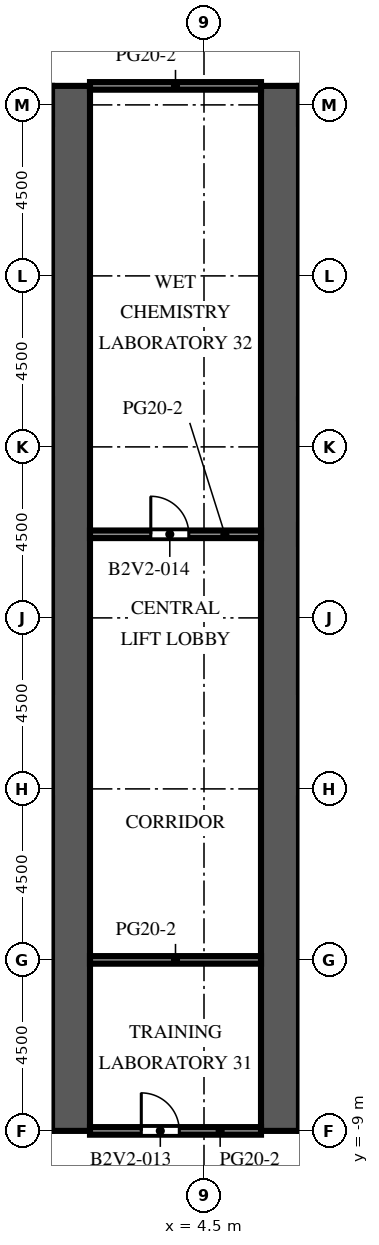
"""IFC4 building model, lengths in metres.
Left out: names, types, materials, properties, quantities, classifications, styles, units other than length and angle.
Written with IfcOpenShell. Run it as: python <this file> out.ifc"""

import sys

from ifc_helpers import new_model, si_unit, direction, frame, frame_2d, origin, place, context, subcontext, project, spatial, rectangle, extrude, element, fill, save


model = new_model("IFC4")
c1 = context("Model", 3, precision=1e-05, world=origin(), true_north=direction((0.0, 1.0)))
c2 = subcontext(c1, "Body", "Model", "MODEL_VIEW")
j1 = project(units=[si_unit("LENGTHUNIT", "METRE"), si_unit("PLANEANGLEUNIT", "RADIAN")], contexts=[c1])
p1 = place(None, origin())
s1 = spatial("IfcSite", under=j1, at=p1, CompositionType="ELEMENT")
p2 = place(p1, origin())
s2 = spatial("IfcBuilding", under=s1, at=p2, CompositionType="ELEMENT")
p3 = place(p2, frame((0.0, 0.0, 66.5)))
s3 = spatial("IfcBuildingStorey", under=s2, at=p3, CompositionType="ELEMENT", Elevation=66.5)
p4 = place(p3, frame((1.0, -9.0, 0.0), z_axis=(0.0, 0.0, 1.0), x_axis=(0.0, 1.0, 0.0)))
e1 = element("IfcWall", 1, at=p4, inside=s3, PredefinedType="SHEAR", context=c2, shape_type="SweptSolid", body=[
    extrude(rectangle(XDim=27.5, YDim=1.0, at=frame_2d((13.75, 0.0))), origin(), (0.0, 0.0, 1.0), 4.1),
])
p5 = place(p4, frame((12.55, 0.0, 0.0)))
e2 = element("IfcOpeningElement", 2, at=p5, cuts=e1, PredefinedType="OPENING", context=c2, shape_type="SweptSolid", body=[
    extrude(rectangle(XDim=2.4, YDim=2.4, at=frame_2d((1.2, 1.2))), frame((0.0, 0.51, 0.0), z_axis=(0.0, -1.0, 0.0), x_axis=(1.0, 0.0, 0.0)), (0.0, 0.0, 1.0), 1.02),
])
p6 = place(p4, frame((5.55, 0.0, 0.0)))
e3 = element("IfcOpeningElement", 3, at=p6, cuts=e1, PredefinedType="OPENING", context=c2, shape_type="SweptSolid", body=[
    extrude(rectangle(XDim=0.905, YDim=2.1, at=frame_2d((0.453, 1.05))), frame((0.0, 0.51, 0.0), z_axis=(0.0, -1.0, 0.0), x_axis=(1.0, 0.0, 0.0)), (0.0, 0.0, 1.0), 1.02),
])
p7 = place(p4, frame((23.363, 0.0, 0.0)))
e4 = element("IfcOpeningElement", 4, at=p7, cuts=e1, PredefinedType="OPENING", context=c2, shape_type="SweptSolid", body=[
    extrude(rectangle(XDim=1.2, YDim=2.1, at=frame_2d((0.6, 1.05))), frame((0.0, 0.51, 0.0), z_axis=(0.0, -1.0, 0.0), x_axis=(1.0, 0.0, 0.0)), (0.0, 0.0, 1.0), 1.02),
])
p8 = place(p3, frame((6.5, -9.0, 0.0), z_axis=(0.0, 0.0, 1.0), x_axis=(0.0, 1.0, 0.0)))
e5 = element("IfcWall", 5, at=p8, inside=s3, PredefinedType="SHEAR", context=c2, shape_type="SweptSolid", body=[
    extrude(rectangle(XDim=27.5, YDim=1.0, at=frame_2d((13.75, 0.0))), origin(), (0.0, 0.0, 1.0), 4.1),
])
p9 = place(p8, frame((12.55, 0.0, 0.0)))
e6 = element("IfcOpeningElement", 6, at=p9, cuts=e5, PredefinedType="OPENING", context=c2, shape_type="SweptSolid", body=[
    extrude(rectangle(XDim=2.4, YDim=2.4, at=frame_2d((1.2, 1.2))), frame((0.0, 0.51, 0.0), z_axis=(0.0, -1.0, 0.0), x_axis=(1.0, 0.0, 0.0)), (0.0, 0.0, 1.0), 1.02),
])
p10 = place(p8, frame((5.55, 0.0, 0.0)))
e7 = element("IfcOpeningElement", 7, at=p10, cuts=e5, PredefinedType="OPENING", context=c2, shape_type="SweptSolid", body=[
    extrude(rectangle(XDim=0.905, YDim=2.1, at=frame_2d((0.453, 1.05))), frame((0.0, 0.51, 0.0), z_axis=(0.0, -1.0, 0.0), x_axis=(1.0, 0.0, 0.0)), (0.0, 0.0, 1.0), 1.02),
])
p11 = place(p8, frame((23.363, 0.0, 0.0)))
e8 = element("IfcOpeningElement", 8, at=p11, cuts=e5, PredefinedType="OPENING", context=c2, shape_type="SweptSolid", body=[
    extrude(rectangle(XDim=1.2, YDim=2.1, at=frame_2d((0.6, 1.05))), frame((0.0, 0.51, 0.0), z_axis=(0.0, -1.0, 0.0), x_axis=(1.0, 0.0, 0.0)), (0.0, 0.0, 1.0), 1.02),
])
p12 = place(p3, frame((7.0, 12.425, 0.0), z_axis=(0.0, 0.0, 1.0), x_axis=(1.0, 0.0, 0.0)))
e9 = element("IfcWall", 9, at=p12, inside=s3, PredefinedType="PARTITIONING", context=c2, shape_type="SweptSolid", body=[
    extrude(rectangle(XDim=1.3, YDim=0.1, at=frame_2d((0.65, 0.0))), origin(), (0.0, 0.0, 1.0), 3.5),
])
p13 = place(p12, frame((0.2, 0.0, 0.0)))
e10 = element("IfcOpeningElement", 10, at=p13, cuts=e9, PredefinedType="OPENING", context=c2, shape_type="SweptSolid", body=[
    extrude(rectangle(XDim=0.9, YDim=2.1, at=frame_2d((0.45, 1.05))), frame((0.0, 0.06, 0.0), z_axis=(0.0, -1.0, 0.0), x_axis=(1.0, 0.0, 0.0)), (0.0, 0.0, 1.0), 0.12),
])
p14 = place(p3, frame((1.5, -9.0, 0.0), z_axis=(0.0, 0.0, 1.0), x_axis=(1.0, 0.0, 0.0)))
e11 = element("IfcWall", 11, at=p14, inside=s3, PredefinedType="PARTITIONING", context=c2, shape_type="SweptSolid", body=[
    extrude(rectangle(XDim=4.5, YDim=0.2, at=frame_2d((2.25, 0.0))), origin(), (0.0, 0.0, 1.0), 3.5),
])
p15 = place(p14, frame((1.35, 0.0, 0.0)))
e12 = element("IfcOpeningElement", 12, at=p15, cuts=e11, PredefinedType="OPENING", context=c2, shape_type="SweptSolid", body=[
    extrude(rectangle(XDim=1.0, YDim=2.1, at=frame_2d((0.5, 1.05))), frame((0.0, 0.11, 0.0), z_axis=(0.0, -1.0, 0.0), x_axis=(1.0, 0.0, 0.0)), (0.0, 0.0, 1.0), 0.22),
])
p16 = place(p3, frame((1.5, -4.5, 0.0), z_axis=(0.0, 0.0, 1.0), x_axis=(1.0, 0.0, 0.0)))
e13 = element("IfcWall", 13, at=p16, inside=s3, PredefinedType="PARTITIONING", context=c2, shape_type="SweptSolid", body=[
    extrude(rectangle(XDim=4.5, YDim=0.2, at=frame_2d((2.25, 0.0))), origin(), (0.0, 0.0, 1.0), 3.5),
])
p17 = place(p3, frame((1.5, 6.7, 0.0), z_axis=(0.0, 0.0, 1.0), x_axis=(1.0, 0.0, 0.0)))
e14 = element("IfcWall", 14, at=p17, inside=s3, PredefinedType="PARTITIONING", context=c2, shape_type="SweptSolid", body=[
    extrude(rectangle(XDim=4.5, YDim=0.2, at=frame_2d((2.25, 0.0))), origin(), (0.0, 0.0, 1.0), 3.5),
])
p18 = place(p17, frame((1.6, 0.0, 0.0)))
e15 = element("IfcOpeningElement", 15, at=p18, cuts=e14, PredefinedType="OPENING", context=c2, shape_type="SweptSolid", body=[
    extrude(rectangle(XDim=1.0, YDim=2.1, at=frame_2d((0.5, 1.05))), frame((0.0, 0.11, 0.0), z_axis=(0.0, -1.0, 0.0), x_axis=(1.0, 0.0, 0.0)), (0.0, 0.0, 1.0), 0.22),
])
p19 = place(p3, frame((1.5, 18.5, 0.0), z_axis=(0.0, 0.0, 1.0), x_axis=(1.0, 0.0, 0.0)))
e16 = element("IfcWall", 16, at=p19, inside=s3, PredefinedType="PARTITIONING", context=c2, shape_type="SweptSolid", body=[
    extrude(rectangle(XDim=4.5, YDim=0.2, at=frame_2d((2.25, 0.0))), origin(), (0.0, 0.0, 1.0), 3.5),
])
p20 = place(p5, origin())
e17 = element("IfcDoor", 17, at=p20, inside=s3, OperationType="DOUBLE_DOOR_DOUBLE_SWING", PredefinedType="DOOR", context=c2, shape_type="SweptSolid", body=[
    extrude(rectangle(XDim=2.4, YDim=2.4, at=frame_2d((1.2, 1.2))), frame((0.0, 0.025, 0.0), z_axis=(0.0, -1.0, 0.0), x_axis=(1.0, 0.0, 0.0)), (0.0, 0.0, 1.0), 0.05),
])
fill(e2, e17)
p21 = place(p9, origin())
e18 = element("IfcDoor", 18, at=p21, inside=s3, OperationType="DOUBLE_DOOR_DOUBLE_SWING", PredefinedType="DOOR", context=c2, shape_type="SweptSolid", body=[
    extrude(rectangle(XDim=2.4, YDim=2.4, at=frame_2d((1.2, 1.2))), frame((0.0, 0.025, 0.0), z_axis=(0.0, -1.0, 0.0), x_axis=(1.0, 0.0, 0.0)), (0.0, 0.0, 1.0), 0.05),
])
fill(e6, e18)
p22 = place(p6, origin())
e19 = element("IfcDoor", 19, at=p22, inside=s3, OperationType="SINGLE_SWING_LEFT", PredefinedType="DOOR", context=c2, shape_type="SweptSolid", body=[
    extrude(rectangle(XDim=0.905, YDim=2.1, at=frame_2d((0.453, 1.05))), frame((0.0, 0.475, 0.0), z_axis=(0.0, -1.0, 0.0), x_axis=(1.0, 0.0, 0.0)), (0.0, 0.0, 1.0), 0.05),
])
fill(e3, e19)
p23 = place(p7, origin())
e20 = element("IfcDoor", 20, at=p23, inside=s3, OperationType="SINGLE_SWING_RIGHT", PredefinedType="DOOR", context=c2, shape_type="SweptSolid", body=[
    extrude(rectangle(XDim=1.2, YDim=2.1, at=frame_2d((0.6, 1.05))), frame((0.0, 0.475, 0.0), z_axis=(0.0, -1.0, 0.0), x_axis=(1.0, 0.0, 0.0)), (0.0, 0.0, 1.0), 0.05),
])
fill(e4, e20)
p24 = place(p10, origin())
e21 = element("IfcDoor", 21, at=p24, inside=s3, OperationType="SINGLE_SWING_RIGHT", PredefinedType="DOOR", context=c2, shape_type="SweptSolid", body=[
    extrude(rectangle(XDim=0.905, YDim=2.1, at=frame_2d((0.453, 1.05))), frame((0.0, -0.425, 0.0), z_axis=(0.0, -1.0, 0.0), x_axis=(1.0, 0.0, 0.0)), (0.0, 0.0, 1.0), 0.05),
])
fill(e7, e21)
p25 = place(p11, origin())
e22 = element("IfcDoor", 22, at=p25, inside=s3, OperationType="SINGLE_SWING_LEFT", PredefinedType="DOOR", context=c2, shape_type="SweptSolid", body=[
    extrude(rectangle(XDim=1.2, YDim=2.1, at=frame_2d((0.6, 1.05))), frame((0.0, -0.425, 0.0), z_axis=(0.0, -1.0, 0.0), x_axis=(1.0, 0.0, 0.0)), (0.0, 0.0, 1.0), 0.05),
])
fill(e8, e22)
p26 = place(p15, origin())
e23 = element("IfcDoor", 23, at=p26, inside=s3, OperationType="SINGLE_SWING_LEFT", PredefinedType="DOOR", context=c2, shape_type="SweptSolid", body=[
    extrude(rectangle(XDim=1.0, YDim=2.1, at=frame_2d((0.5, 1.05))), frame((0.0, 0.025, 0.0), z_axis=(0.0, -1.0, 0.0), x_axis=(1.0, 0.0, 0.0)), (0.0, 0.0, 1.0), 0.05),
])
fill(e12, e23)
p27 = place(p18, origin())
e24 = element("IfcDoor", 24, at=p27, inside=s3, OperationType="SINGLE_SWING_LEFT", PredefinedType="DOOR", context=c2, shape_type="SweptSolid", body=[
    extrude(rectangle(XDim=1.0, YDim=2.1, at=frame_2d((0.5, 1.05))), frame((0.0, 0.025, 0.0), z_axis=(0.0, -1.0, 0.0), x_axis=(1.0, 0.0, 0.0)), (0.0, 0.0, 1.0), 0.05),
])
fill(e15, e24)
save(model, sys.argv[1])
